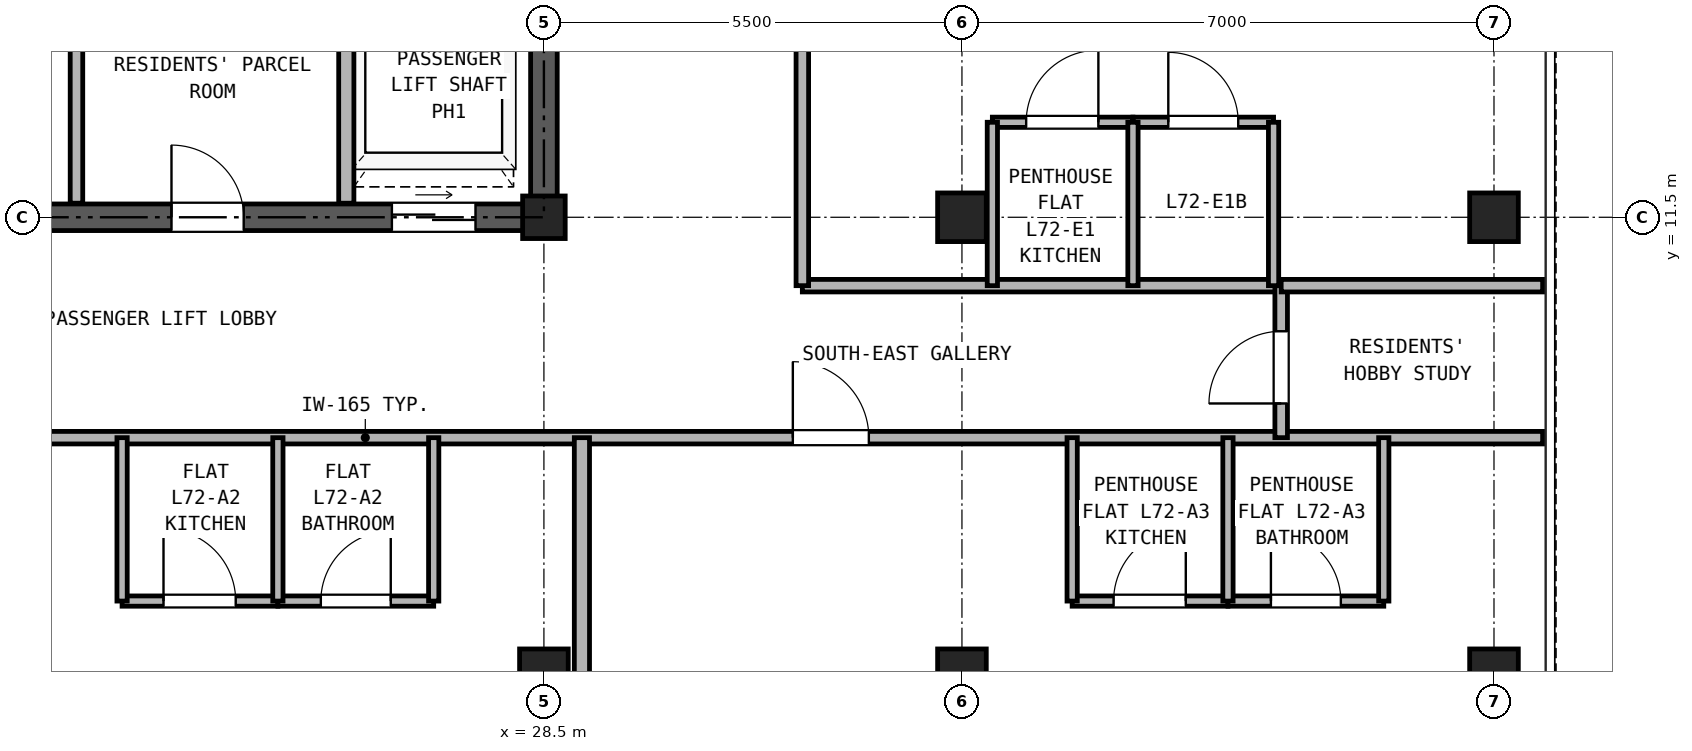
"""IFC4 building model, lengths in metres.
Left out: names, types, materials, properties, quantities, classifications, styles, units other than length and angle.
Written with IfcOpenShell. Run it as: python <this file> out.ifc"""

import sys

from ifc_helpers import new_model, si_unit, direction, frame, frame_2d, origin, origin_2d, place, context, subcontext, project, spatial, rectangle, hollow_rectangle, extrude, source, transform, mapped, element, fill, save


model = new_model("IFC4")
c1 = context("Model", 3, precision=1e-05, world=origin(), true_north=direction((0.0, 1.0)))
c2 = subcontext(c1, "Body", "Model", "MODEL_VIEW")
j1 = project(units=[si_unit("LENGTHUNIT", "METRE"), si_unit("PLANEANGLEUNIT", "RADIAN")], contexts=[c1])
p1 = place(None, origin())
s1 = spatial("IfcSite", under=j1, at=p1, CompositionType="ELEMENT")
p2 = place(p1, origin())
s2 = spatial("IfcBuilding", under=s1, at=p2, CompositionType="ELEMENT")
p3 = place(p2, frame((0.0, 0.0, 252.1)))
s3 = spatial("IfcBuildingStorey", under=s2, at=p3, CompositionType="ELEMENT", Elevation=252.1)
m1 = source(origin(), c2, "Body", "SweptSolid", [
    extrude(hollow_rectangle(XDim=0.64, YDim=0.64, WallThickness=0.035, at=origin_2d()), origin(), (0.0, 0.0, 1.0), 2.98),
])
for number, where, z_axis, x_axis in (
    (1, (41.0, 5.5, 0.0), (0.0, 0.0, 1.0), (1.0, 0.0, 0.0)),
    (2, (41.0, 11.5, 0.0), (0.0, 0.0, 1.0), (1.0, 0.0, 0.0)),
    (3, (28.5, 5.5, 0.0), (0.0, 0.0, 1.0), (1.0, 0.0, 0.0)),
):
    element("IfcColumn", number, at=place(p3, frame(where, z_axis=z_axis, x_axis=x_axis)), inside=s3, PredefinedType="COLUMN", context=c2, shape_type="MappedRepresentation", body=[
        mapped(m1, transform((0.0, 0.0, 0.0), x_axis=(1.0, 0.0, 0.0), y_axis=(0.0, 1.0, 0.0), z_axis=(0.0, 0.0, 1.0), scale=1.0)),
    ])
m2 = source(origin(), c2, "Body", "SweptSolid", [
    extrude(hollow_rectangle(XDim=0.56, YDim=0.56, WallThickness=0.03, at=origin_2d()), origin(), (0.0, 0.0, 1.0), 2.98),
])
p4 = place(p3, frame((28.5, 11.5, 0.0), z_axis=(0.0, 0.0, 1.0), x_axis=(1.0, 0.0, 0.0)))
e4 = element("IfcColumn", 4, at=p4, inside=s3, PredefinedType="COLUMN", context=c2, shape_type="MappedRepresentation", body=[
    mapped(m2, transform((0.0, 0.0, 0.0), x_axis=(1.0, 0.0, 0.0), y_axis=(0.0, 1.0, 0.0), z_axis=(0.0, 0.0, 1.0), scale=1.0)),
])
for number, where, z_axis, x_axis in (
    (5, (34.0, 5.5, 0.0), (0.0, 0.0, 1.0), (1.0, 0.0, 0.0)),
    (6, (34.0, 11.5, 0.0), (0.0, 0.0, 1.0), (1.0, 0.0, 0.0)),
):
    element("IfcColumn", number, at=place(p3, frame(where, z_axis=z_axis, x_axis=x_axis)), inside=s3, PredefinedType="COLUMN", context=c2, shape_type="MappedRepresentation", body=[
        mapped(m1, transform((0.0, 0.0, 0.0), x_axis=(1.0, 0.0, 0.0), y_axis=(0.0, 1.0, 0.0), z_axis=(0.0, 0.0, 1.0), scale=1.0)),
    ])
p5 = place(p3, frame((18.325, 11.5, 0.0), z_axis=(0.0, 0.0, 1.0), x_axis=(1.0, 0.0, 0.0)))
e7 = element("IfcWall", 7, at=p5, inside=s3, PredefinedType="SHEAR", context=c2, shape_type="SweptSolid", body=[
    extrude(rectangle(XDim=10.35, YDim=0.35, at=frame_2d((5.175, 0.0))), origin(), (0.0, 0.0, 1.0), 2.98),
])
p6 = place(p5, frame((1.775, 0.0, 0.0)))
e8 = element("IfcOpeningElement", 8, at=p6, cuts=e7, PredefinedType="OPENING", context=c2, shape_type="SweptSolid", body=[
    extrude(rectangle(XDim=0.95, YDim=2.15, at=frame_2d((0.475, 1.075))), frame((0.0, 0.185, 0.0), z_axis=(0.0, -1.0, 0.0), x_axis=(1.0, 0.0, 0.0)), (0.0, 0.0, 1.0), 0.37),
])
p7 = place(p5, frame((5.275, 0.0, 0.0)))
e9 = element("IfcOpeningElement", 9, at=p7, cuts=e7, PredefinedType="OPENING", context=c2, shape_type="SweptSolid", body=[
    extrude(rectangle(XDim=0.95, YDim=2.15, at=frame_2d((0.475, 1.075))), frame((0.0, 0.185, 0.0), z_axis=(0.0, -1.0, 0.0), x_axis=(1.0, 0.0, 0.0)), (0.0, 0.0, 1.0), 0.37),
])
p8 = place(p5, frame((8.175, 0.0, 0.0)))
e10 = element("IfcOpeningElement", 10, at=p8, cuts=e7, PredefinedType="OPENING", context=c2, shape_type="SweptSolid", body=[
    extrude(rectangle(XDim=1.1, YDim=2.25, at=frame_2d((0.55, 1.125))), frame((0.0, 0.185, 0.0), z_axis=(0.0, -1.0, 0.0), x_axis=(1.0, 0.0, 0.0)), (0.0, 0.0, 1.0), 0.37),
])
p9 = place(p3, frame((28.5, 11.675, 0.0), z_axis=(0.0, 0.0, 1.0), x_axis=(0.0, 1.0, 0.0)))
e11 = element("IfcWall", 11, at=p9, inside=s3, PredefinedType="SHEAR", context=c2, shape_type="SweptSolid", body=[
    extrude(rectangle(XDim=16.9, YDim=0.35, at=frame_2d((8.45, 0.0))), origin(), (0.0, 0.0, 1.0), 2.98),
])
p10 = place(p9, frame((7.475, 0.0, 0.0)))
e12 = element("IfcOpeningElement", 12, at=p10, cuts=e11, PredefinedType="OPENING", context=c2, shape_type="SweptSolid", body=[
    extrude(rectangle(XDim=1.15, YDim=2.2, at=frame_2d((0.575, 1.1))), frame((0.0, 0.185, 0.0), z_axis=(0.0, -1.0, 0.0), x_axis=(1.0, 0.0, 0.0)), (0.0, 0.0, 1.0), 0.37),
])
p11 = place(p3, frame((22.35, 11.685, 0.0), z_axis=(0.0, 0.0, 1.0), x_axis=(0.0, 1.0, 0.0)))
e13 = element("IfcWall", 13, at=p11, inside=s3, PredefinedType="PARTITIONING", context=c2, shape_type="SweptSolid", body=[
    extrude(rectangle(XDim=3.315, YDim=0.165, at=frame_2d((1.657, 0.0))), origin(), (0.0, 0.0, 1.0), 2.98),
])
p12 = place(p3, frame((25.9, 11.685, 0.0), z_axis=(0.0, 0.0, 1.0), x_axis=(0.0, 1.0, 0.0)))
e14 = element("IfcWall", 14, at=p12, inside=s3, PredefinedType="PARTITIONING", context=c2, shape_type="SweptSolid", body=[
    extrude(rectangle(XDim=3.315, YDim=0.2, at=frame_2d((1.657, 0.0))), origin(), (0.0, 0.0, 1.0), 2.98),
])
p13 = place(p3, frame((5.36, 8.6, 0.0), z_axis=(0.0, 0.0, 1.0), x_axis=(1.0, 0.0, 0.0)))
e15 = element("IfcWall", 15, at=p13, inside=s3, PredefinedType="PARTITIONING", context=c2, shape_type="SweptSolid", body=[
    extrude(rectangle(XDim=36.28, YDim=0.165, at=frame_2d((18.14, 0.0))), origin(), (0.0, 0.0, 1.0), 2.655),
])
p14 = place(p13, frame((8.365, 0.0, 0.0)))
e16 = element("IfcOpeningElement", 16, at=p14, cuts=e15, PredefinedType="OPENING", context=c2, shape_type="SweptSolid", body=[
    extrude(rectangle(XDim=1.0, YDim=2.15, at=frame_2d((0.5, 1.075))), frame((0.0, 0.093, 0.0), z_axis=(0.0, -1.0, 0.0), x_axis=(1.0, 0.0, 0.0)), (0.0, 0.0, 1.0), 0.185),
])
p15 = place(p13, frame((14.165, 0.0, 0.0)))
e17 = element("IfcOpeningElement", 17, at=p15, cuts=e15, PredefinedType="OPENING", context=c2, shape_type="SweptSolid", body=[
    extrude(rectangle(XDim=1.0, YDim=2.15, at=frame_2d((0.5, 1.075))), frame((0.0, 0.093, 0.0), z_axis=(0.0, -1.0, 0.0), x_axis=(1.0, 0.0, 0.0)), (0.0, 0.0, 1.0), 0.185),
])
p16 = place(p13, frame((26.415, 0.0, 0.0)))
e18 = element("IfcOpeningElement", 18, at=p16, cuts=e15, PredefinedType="OPENING", context=c2, shape_type="SweptSolid", body=[
    extrude(rectangle(XDim=1.0, YDim=2.15, at=frame_2d((0.5, 1.075))), frame((0.0, 0.093, 0.0), z_axis=(0.0, -1.0, 0.0), x_axis=(1.0, 0.0, 0.0)), (0.0, 0.0, 1.0), 0.185),
])
p17 = place(p3, frame((31.9, 10.6, 0.0), z_axis=(0.0, 0.0, 1.0), x_axis=(1.0, 0.0, 0.0)))
e19 = element("IfcWall", 19, at=p17, inside=s3, PredefinedType="PARTITIONING", context=c2, shape_type="SweptSolid", body=[
    extrude(rectangle(XDim=6.3, YDim=0.165, at=frame_2d((3.15, 0.0))), origin(), (0.0, 0.0, 1.0), 2.98),
])
p18 = place(p3, frame((38.2, 8.6, 0.0), z_axis=(0.0, 0.0, 1.0), x_axis=(0.0, 1.0, 0.0)))
e20 = element("IfcWall", 20, at=p18, inside=s3, PredefinedType="PARTITIONING", context=c2, shape_type="SweptSolid", body=[
    extrude(rectangle(XDim=2.0, YDim=0.165, at=frame_2d((1.0, 0.0))), origin(), (0.0, 0.0, 1.0), 2.98),
])
p19 = place(p18, frame((0.45, 0.0, 0.0)))
e21 = element("IfcOpeningElement", 21, at=p19, cuts=e20, PredefinedType="OPENING", context=c2, shape_type="SweptSolid", body=[
    extrude(rectangle(XDim=0.95, YDim=2.15, at=frame_2d((0.475, 1.075))), frame((0.0, 0.093, 0.0), z_axis=(0.0, -1.0, 0.0), x_axis=(1.0, 0.0, 0.0)), (0.0, 0.0, 1.0), 0.185),
])
p20 = place(p3, frame((31.9, 10.6, 0.0), z_axis=(0.0, 0.0, 1.0), x_axis=(0.0, 1.0, 0.0)))
e22 = element("IfcWall", 22, at=p20, inside=s3, PredefinedType="PARTITIONING", context=c2, shape_type="SweptSolid", body=[
    extrude(rectangle(XDim=24.54, YDim=0.165, at=frame_2d((12.27, 0.0))), origin(), (0.0, 0.0, 1.0), 2.98),
])
p21 = place(p20, frame((4.95, 0.0, 0.0)))
e23 = element("IfcOpeningElement", 23, at=p21, cuts=e22, PredefinedType="OPENING", context=c2, shape_type="SweptSolid", body=[
    extrude(rectangle(XDim=1.0, YDim=2.15, at=frame_2d((0.5, 1.075))), frame((0.0, 0.093, 0.0), z_axis=(0.0, -1.0, 0.0), x_axis=(1.0, 0.0, 0.0)), (0.0, 0.0, 1.0), 0.185),
])
p22 = place(p20, frame((15.65, 0.0, 0.0)))
e24 = element("IfcOpeningElement", 24, at=p22, cuts=e22, PredefinedType="OPENING", context=c2, shape_type="SweptSolid", body=[
    extrude(rectangle(XDim=1.0, YDim=2.15, at=frame_2d((0.5, 1.075))), frame((0.0, 0.093, 0.0), z_axis=(0.0, -1.0, 0.0), x_axis=(1.0, 0.0, 0.0)), (0.0, 0.0, 1.0), 0.185),
])
p23 = place(p3, frame((22.95, 6.45, 0.0), z_axis=(0.0, 0.0, 1.0), x_axis=(1.0, 0.0, 0.0)))
e25 = element("IfcWall", 25, at=p23, inside=s3, PredefinedType="PARTITIONING", context=c2, shape_type="SweptSolid", body=[
    extrude(rectangle(XDim=2.05, YDim=0.135, at=frame_2d((1.025, 0.0))), origin(), (0.0, 0.0, 1.0), 2.98),
])
p24 = place(p23, frame((0.545, 0.0, 0.0)))
e26 = element("IfcOpeningElement", 26, at=p24, cuts=e25, PredefinedType="OPENING", context=c2, shape_type="SweptSolid", body=[
    extrude(rectangle(XDim=0.95, YDim=2.15, at=frame_2d((0.475, 1.075))), frame((0.0, 0.077, 0.0), z_axis=(0.0, -1.0, 0.0), x_axis=(1.0, 0.0, 0.0)), (0.0, 0.0, 1.0), 0.155),
])
p25 = place(p3, frame((25.0, 6.45, 0.0), z_axis=(0.0, 0.0, 1.0), x_axis=(1.0, 0.0, 0.0)))
e27 = element("IfcWall", 27, at=p25, inside=s3, PredefinedType="PARTITIONING", context=c2, shape_type="SweptSolid", body=[
    extrude(rectangle(XDim=2.05, YDim=0.135, at=frame_2d((1.025, 0.0))), origin(), (0.0, 0.0, 1.0), 2.98),
])
p26 = place(p25, frame((0.565, 0.0, 0.0)))
e28 = element("IfcOpeningElement", 28, at=p26, cuts=e27, PredefinedType="OPENING", context=c2, shape_type="SweptSolid", body=[
    extrude(rectangle(XDim=0.92, YDim=2.1, at=frame_2d((0.46, 1.05))), frame((0.0, 0.077, 0.0), z_axis=(0.0, -1.0, 0.0), x_axis=(1.0, 0.0, 0.0)), (0.0, 0.0, 1.0), 0.155),
])
for number, where, z_axis, x_axis in (
    (29, (22.95, 6.45, 0.0), (0.0, 0.0, 1.0), (0.0, 1.0, 0.0)),
    (30, (25.0, 6.45, 0.0), (0.0, 0.0, 1.0), (0.0, 1.0, 0.0)),
    (31, (27.05, 6.45, 0.0), (0.0, 0.0, 1.0), (0.0, 1.0, 0.0)),
):
    element("IfcWall", number, at=place(p3, frame(where, z_axis=z_axis, x_axis=x_axis)), inside=s3, PredefinedType="PARTITIONING", context=c2, shape_type="SweptSolid", body=[
        extrude(rectangle(XDim=2.15, YDim=0.135, at=frame_2d((1.075, 0.0))), origin(), (0.0, 0.0, 1.0), 2.98),
    ])
p27 = place(p3, frame((29.0, 0.16, 0.0), z_axis=(0.0, 0.0, 1.0), x_axis=(0.0, 1.0, 0.0)))
e32 = element("IfcWall", 32, at=p27, inside=s3, PredefinedType="PARTITIONING", context=c2, shape_type="SweptSolid", body=[
    extrude(rectangle(XDim=8.44, YDim=0.2, at=frame_2d((4.22, 0.0))), origin(), (0.0, 0.0, 1.0), 2.98),
])
p28 = place(p3, frame((35.45, 6.45, 0.0), z_axis=(0.0, 0.0, 1.0), x_axis=(1.0, 0.0, 0.0)))
e33 = element("IfcWall", 33, at=p28, inside=s3, PredefinedType="PARTITIONING", context=c2, shape_type="SweptSolid", body=[
    extrude(rectangle(XDim=2.05, YDim=0.135, at=frame_2d((1.025, 0.0))), origin(), (0.0, 0.0, 1.0), 2.98),
])
p29 = place(p28, frame((0.545, 0.0, 0.0)))
e34 = element("IfcOpeningElement", 34, at=p29, cuts=e33, PredefinedType="OPENING", context=c2, shape_type="SweptSolid", body=[
    extrude(rectangle(XDim=0.95, YDim=2.15, at=frame_2d((0.475, 1.075))), frame((0.0, 0.077, 0.0), z_axis=(0.0, -1.0, 0.0), x_axis=(1.0, 0.0, 0.0)), (0.0, 0.0, 1.0), 0.155),
])
p30 = place(p3, frame((37.5, 6.45, 0.0), z_axis=(0.0, 0.0, 1.0), x_axis=(1.0, 0.0, 0.0)))
e35 = element("IfcWall", 35, at=p30, inside=s3, PredefinedType="PARTITIONING", context=c2, shape_type="SweptSolid", body=[
    extrude(rectangle(XDim=2.05, YDim=0.135, at=frame_2d((1.025, 0.0))), origin(), (0.0, 0.0, 1.0), 2.98),
])
p31 = place(p30, frame((0.565, 0.0, 0.0)))
e36 = element("IfcOpeningElement", 36, at=p31, cuts=e35, PredefinedType="OPENING", context=c2, shape_type="SweptSolid", body=[
    extrude(rectangle(XDim=0.92, YDim=2.1, at=frame_2d((0.46, 1.05))), frame((0.0, 0.077, 0.0), z_axis=(0.0, -1.0, 0.0), x_axis=(1.0, 0.0, 0.0)), (0.0, 0.0, 1.0), 0.155),
])
for number, where, z_axis, x_axis in (
    (37, (35.45, 6.45, 0.0), (0.0, 0.0, 1.0), (0.0, 1.0, 0.0)),
    (38, (37.5, 6.45, 0.0), (0.0, 0.0, 1.0), (0.0, 1.0, 0.0)),
    (39, (39.55, 6.45, 0.0), (0.0, 0.0, 1.0), (0.0, 1.0, 0.0)),
):
    element("IfcWall", number, at=place(p3, frame(where, z_axis=z_axis, x_axis=x_axis)), inside=s3, PredefinedType="PARTITIONING", context=c2, shape_type="SweptSolid", body=[
        extrude(rectangle(XDim=2.15, YDim=0.135, at=frame_2d((1.075, 0.0))), origin(), (0.0, 0.0, 1.0), 2.98),
    ])
p32 = place(p3, frame((38.2, 10.6, 0.0), z_axis=(0.0, 0.0, 1.0), x_axis=(1.0, 0.0, 0.0)))
e40 = element("IfcWall", 40, at=p32, inside=s3, PredefinedType="PARTITIONING", context=c2, shape_type="SweptSolid", body=[
    extrude(rectangle(XDim=3.44, YDim=0.165, at=frame_2d((1.72, 0.0))), origin(), (0.0, 0.0, 1.0), 2.98),
])
p33 = place(p3, frame((34.4, 12.75, 0.0), z_axis=(0.0, 0.0, 1.0), x_axis=(1.0, 0.0, 0.0)))
e41 = element("IfcWall", 41, at=p33, inside=s3, PredefinedType="PARTITIONING", context=c2, shape_type="SweptSolid", body=[
    extrude(rectangle(XDim=1.85, YDim=0.135, at=frame_2d((0.925, 0.0))), origin(), (0.0, 0.0, 1.0), 2.98),
])
p34 = place(p33, frame((0.445, 0.0, 0.0)))
e42 = element("IfcOpeningElement", 42, at=p34, cuts=e41, PredefinedType="OPENING", context=c2, shape_type="SweptSolid", body=[
    extrude(rectangle(XDim=0.95, YDim=2.15, at=frame_2d((0.475, 1.075))), frame((0.0, 0.077, 0.0), z_axis=(0.0, -1.0, 0.0), x_axis=(1.0, 0.0, 0.0)), (0.0, 0.0, 1.0), 0.155),
])
p35 = place(p3, frame((36.25, 12.75, 0.0), z_axis=(0.0, 0.0, 1.0), x_axis=(1.0, 0.0, 0.0)))
e43 = element("IfcWall", 43, at=p35, inside=s3, PredefinedType="PARTITIONING", context=c2, shape_type="SweptSolid", body=[
    extrude(rectangle(XDim=1.85, YDim=0.135, at=frame_2d((0.925, 0.0))), origin(), (0.0, 0.0, 1.0), 2.98),
])
p36 = place(p35, frame((0.465, 0.0, 0.0)))
e44 = element("IfcOpeningElement", 44, at=p36, cuts=e43, PredefinedType="OPENING", context=c2, shape_type="SweptSolid", body=[
    extrude(rectangle(XDim=0.92, YDim=2.1, at=frame_2d((0.46, 1.05))), frame((0.0, 0.077, 0.0), z_axis=(0.0, -1.0, 0.0), x_axis=(1.0, 0.0, 0.0)), (0.0, 0.0, 1.0), 0.155),
])
for number, where, z_axis, x_axis in (
    (45, (34.4, 10.6, 0.0), (0.0, 0.0, 1.0), (0.0, 1.0, 0.0)),
    (46, (36.25, 10.6, 0.0), (0.0, 0.0, 1.0), (0.0, 1.0, 0.0)),
    (47, (38.1, 10.6, 0.0), (0.0, 0.0, 1.0), (0.0, 1.0, 0.0)),
):
    element("IfcWall", number, at=place(p3, frame(where, z_axis=z_axis, x_axis=x_axis)), inside=s3, PredefinedType="PARTITIONING", context=c2, shape_type="SweptSolid", body=[
        extrude(rectangle(XDim=2.15, YDim=0.135, at=frame_2d((1.075, 0.0))), origin(), (0.0, 0.0, 1.0), 2.98),
    ])
p37 = place(p7, frame((0.95, 0.0, 0.0), z_axis=(0.0, 0.0, 1.0), x_axis=(-1.0, 0.0, 0.0)))
e48 = element("IfcDoor", 48, at=p37, inside=s3, OperationType="SINGLE_SWING_LEFT", PredefinedType="DOOR", context=c2, shape_type="SweptSolid", body=[
    extrude(rectangle(XDim=0.95, YDim=2.15, at=frame_2d((0.475, 1.075))), frame((0.0, 0.025, 0.0), z_axis=(0.0, -1.0, 0.0), x_axis=(1.0, 0.0, 0.0)), (0.0, 0.0, 1.0), 0.05),
])
fill(e9, e48)
p38 = place(p8, frame((1.1, 0.0, 0.0), z_axis=(0.0, 0.0, 1.0), x_axis=(-1.0, 0.0, 0.0)))
e49 = element("IfcDoor", 49, at=p38, inside=s3, OperationType="DOUBLE_DOOR_SLIDING", PredefinedType="DOOR", context=c2, shape_type="SweptSolid", body=[
    extrude(rectangle(XDim=1.1, YDim=2.25, at=frame_2d((0.55, 1.125))), frame((0.0, 0.025, 0.0), z_axis=(0.0, -1.0, 0.0), x_axis=(1.0, 0.0, 0.0)), (0.0, 0.0, 1.0), 0.05),
])
fill(e10, e49)
p39 = place(p24, origin())
e50 = element("IfcDoor", 50, at=p39, inside=s3, OperationType="SINGLE_SWING_LEFT", PredefinedType="DOOR", context=c2, shape_type="SweptSolid", body=[
    extrude(rectangle(XDim=0.95, YDim=2.15, at=frame_2d((0.475, 1.075))), frame((0.0, 0.025, 0.0), z_axis=(0.0, -1.0, 0.0), x_axis=(1.0, 0.0, 0.0)), (0.0, 0.0, 1.0), 0.05),
])
fill(e26, e50)
p40 = place(p26, origin())
e51 = element("IfcDoor", 51, at=p40, inside=s3, OperationType="SINGLE_SWING_RIGHT", PredefinedType="DOOR", context=c2, shape_type="SweptSolid", body=[
    extrude(rectangle(XDim=0.92, YDim=2.1, at=frame_2d((0.46, 1.05))), frame((0.0, 0.025, 0.0), z_axis=(0.0, -1.0, 0.0), x_axis=(1.0, 0.0, 0.0)), (0.0, 0.0, 1.0), 0.05),
])
fill(e28, e51)
p41 = place(p29, origin())
e52 = element("IfcDoor", 52, at=p41, inside=s3, OperationType="SINGLE_SWING_RIGHT", PredefinedType="DOOR", context=c2, shape_type="SweptSolid", body=[
    extrude(rectangle(XDim=0.95, YDim=2.15, at=frame_2d((0.475, 1.075))), frame((0.0, 0.025, 0.0), z_axis=(0.0, -1.0, 0.0), x_axis=(1.0, 0.0, 0.0)), (0.0, 0.0, 1.0), 0.05),
])
fill(e34, e52)
p42 = place(p31, origin())
e53 = element("IfcDoor", 53, at=p42, inside=s3, OperationType="SINGLE_SWING_LEFT", PredefinedType="DOOR", context=c2, shape_type="SweptSolid", body=[
    extrude(rectangle(XDim=0.92, YDim=2.1, at=frame_2d((0.46, 1.05))), frame((0.0, 0.025, 0.0), z_axis=(0.0, -1.0, 0.0), x_axis=(1.0, 0.0, 0.0)), (0.0, 0.0, 1.0), 0.05),
])
fill(e36, e53)
p43 = place(p16, frame((1.0, 0.0, 0.0), z_axis=(0.0, 0.0, 1.0), x_axis=(-1.0, 0.0, 0.0)))
e54 = element("IfcDoor", 54, at=p43, inside=s3, OperationType="SINGLE_SWING_LEFT", PredefinedType="DOOR", context=c2, shape_type="SweptSolid", body=[
    extrude(rectangle(XDim=1.0, YDim=2.15, at=frame_2d((0.5, 1.075))), frame((0.0, 0.025, 0.0), z_axis=(0.0, -1.0, 0.0), x_axis=(1.0, 0.0, 0.0)), (0.0, 0.0, 1.0), 0.05),
])
fill(e18, e54)
p44 = place(p19, origin())
e55 = element("IfcDoor", 55, at=p44, inside=s3, OperationType="SINGLE_SWING_LEFT", PredefinedType="DOOR", context=c2, shape_type="SweptSolid", body=[
    extrude(rectangle(XDim=0.95, YDim=2.15, at=frame_2d((0.475, 1.075))), frame((0.0, 0.025, 0.0), z_axis=(0.0, -1.0, 0.0), x_axis=(1.0, 0.0, 0.0)), (0.0, 0.0, 1.0), 0.05),
])
fill(e21, e55)
p45 = place(p34, origin())
e56 = element("IfcDoor", 56, at=p45, inside=s3, OperationType="SINGLE_SWING_RIGHT", PredefinedType="DOOR", context=c2, shape_type="SweptSolid", body=[
    extrude(rectangle(XDim=0.95, YDim=2.15, at=frame_2d((0.475, 1.075))), frame((0.0, 0.025, 0.0), z_axis=(0.0, -1.0, 0.0), x_axis=(1.0, 0.0, 0.0)), (0.0, 0.0, 1.0), 0.05),
])
fill(e42, e56)
p46 = place(p36, origin())
e57 = element("IfcDoor", 57, at=p46, inside=s3, OperationType="SINGLE_SWING_LEFT", PredefinedType="DOOR", context=c2, shape_type="SweptSolid", body=[
    extrude(rectangle(XDim=0.92, YDim=2.1, at=frame_2d((0.46, 1.05))), frame((0.0, 0.025, 0.0), z_axis=(0.0, -1.0, 0.0), x_axis=(1.0, 0.0, 0.0)), (0.0, 0.0, 1.0), 0.05),
])
fill(e44, e57)
save(model, sys.argv[1])
